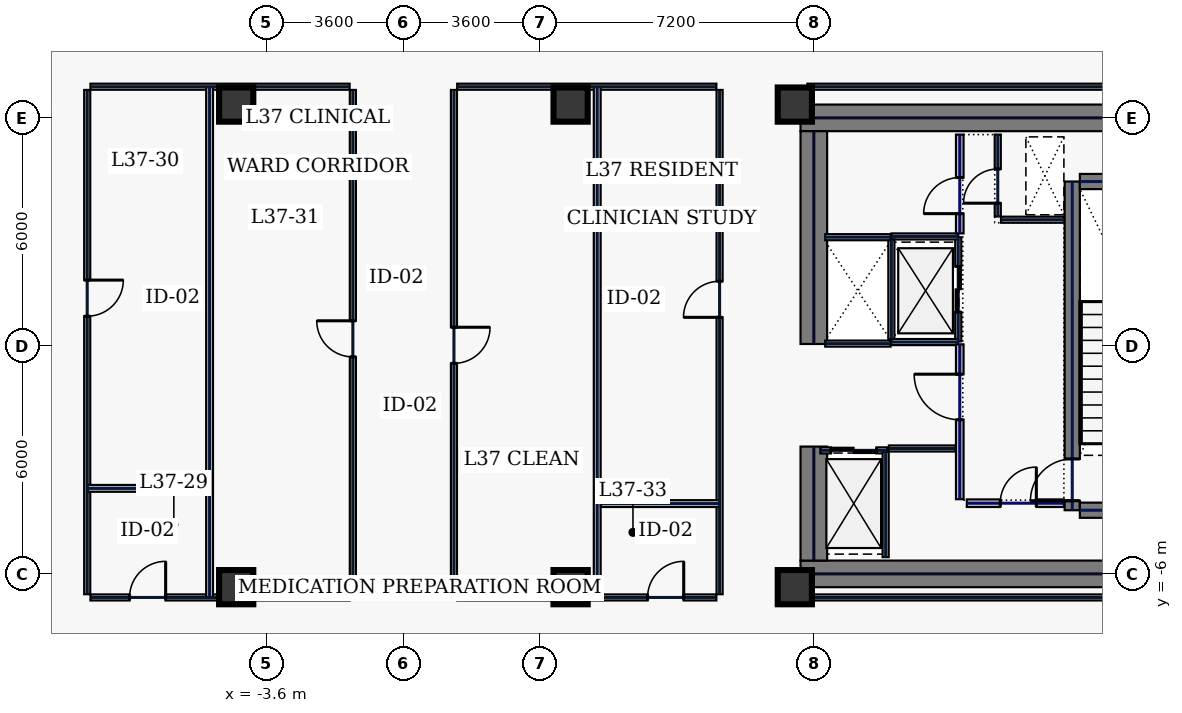
"""IFC4 building model, lengths in metres.
Left out: names, types, materials, properties, quantities, classifications, styles, units other than length and angle.
Written with IfcOpenShell. Run it as: python <this file> out.ifc"""

import sys

from ifc_helpers import new_model, si_unit, direction, frame, frame_2d, origin, origin_2d, place, context, subcontext, project, spatial, rectangle, hollow_rectangle, extrude, element, fill, save


model = new_model("IFC4")
c1 = context("Model", 3, precision=1e-05, world=origin(), true_north=direction((0.0, 1.0)))
c2 = subcontext(c1, "Body", "Model", "MODEL_VIEW")
j1 = project(units=[si_unit("LENGTHUNIT", "METRE"), si_unit("PLANEANGLEUNIT", "RADIAN")], contexts=[c1])
p1 = place(None, origin())
s1 = spatial("IfcSite", under=j1, at=p1, CompositionType="ELEMENT")
p2 = place(p1, origin())
s2 = spatial("IfcBuilding", under=s1, at=p2, CompositionType="ELEMENT")
p3 = place(p2, frame((0.0, 0.0, 164.2)))
s3 = spatial("IfcBuildingStorey", under=s2, at=p3, CompositionType="ELEMENT", Elevation=164.2)
for number, where, z_axis, x_axis in (
    (1, (10.45, 6.0, 0.0), (0.0, 0.0, 1.0), (1.0, 0.0, 0.0)),
    (2, (10.45, -6.0, 0.0), (0.0, 0.0, 1.0), (1.0, 0.0, 0.0)),
):
    element("IfcWall", number, at=place(p3, frame(where, z_axis=z_axis, x_axis=x_axis)), inside=s3, PredefinedType="SHEAR", context=c2, shape_type="SweptSolid", body=[
        extrude(rectangle(XDim=11.55, YDim=0.7, at=frame_2d((5.775, 0.0))), origin(), (0.0, 0.0, 1.0), 3.74),
    ])
p4 = place(p3, frame((10.8, -5.65, 0.0), z_axis=(0.0, 0.0, 1.0), x_axis=(0.0, 1.0, 0.0)))
e3 = element("IfcWall", 3, at=p4, inside=s3, PredefinedType="SHEAR", context=c2, shape_type="SweptSolid", body=[
    extrude(rectangle(XDim=3.0, YDim=0.7, at=frame_2d((1.5, 0.0))), origin(), (0.0, 0.0, 1.0), 3.74),
])
p5 = place(p3, frame((10.8, 0.05, 0.0), z_axis=(0.0, 0.0, 1.0), x_axis=(0.0, 1.0, 0.0)))
e4 = element("IfcWall", 4, at=p5, inside=s3, PredefinedType="SHEAR", context=c2, shape_type="SweptSolid", body=[
    extrude(rectangle(XDim=5.6, YDim=0.7, at=frame_2d((2.8, 0.0))), origin(), (0.0, 0.0, 1.0), 3.74),
])
p6 = place(p3, frame((17.6, -4.325, 0.0), z_axis=(0.0, 0.0, 1.0), x_axis=(0.0, 1.0, 0.0)))
e5 = element("IfcWall", 5, at=p6, inside=s3, PredefinedType="SHEAR", context=c2, shape_type="SweptSolid", body=[
    extrude(rectangle(XDim=8.65, YDim=0.4, at=frame_2d((4.325, 0.0))), origin(), (0.0, 0.0, 1.0), 3.74),
])
p7 = place(p6, frame((0.25, 0.0, 0.0)))
e6 = element("IfcOpeningElement", 6, at=p7, cuts=e5, PredefinedType="OPENING", context=c2, shape_type="SweptSolid", body=[
    extrude(rectangle(XDim=1.1, YDim=2.2, at=frame_2d((0.55, 1.1))), frame((0.0, 0.21, 0.0), z_axis=(0.0, -1.0, 0.0), x_axis=(1.0, 0.0, 0.0)), (0.0, 0.0, 1.0), 0.42),
])
for number, where, z_axis, x_axis in (
    (7, (17.8, -4.325, 0.0), (0.0, 0.0, 1.0), (1.0, 0.0, 0.0)),
    (8, (17.8, 4.325, 0.0), (0.0, 0.0, 1.0), (1.0, 0.0, 0.0)),
):
    element("IfcWall", number, at=place(p3, frame(where, z_axis=z_axis, x_axis=x_axis)), inside=s3, PredefinedType="SHEAR", context=c2, shape_type="SweptSolid", body=[
        extrude(rectangle(XDim=3.4, YDim=0.4, at=frame_2d((1.7, 0.0))), origin(), (0.0, 0.0, 1.0), 3.74),
    ])
for number, where, z_axis, x_axis in (
    (9, (10.3, -6.35, 0.0), (0.0, 0.0, 1.0), (1.0, 0.0, 0.0)),
    (10, (10.3, 6.35, 0.0), (0.0, 0.0, 1.0), (1.0, 0.0, 0.0)),
    (11, (-4.4, -6.35, 0.0), (0.0, 0.0, 1.0), (1.0, 0.0, 0.0)),
    (12, (4.4, -6.35, 0.0), (0.0, 0.0, 1.0), (1.0, 0.0, 0.0)),
    (13, (-4.4, 6.35, 0.0), (0.0, 0.0, 1.0), (1.0, 0.0, 0.0)),
    (14, (4.4, 6.35, 0.0), (0.0, 0.0, 1.0), (1.0, 0.0, 0.0)),
):
    element("IfcColumn", number, at=place(p3, frame(where, z_axis=z_axis, x_axis=x_axis)), inside=s3, PredefinedType="COLUMN", context=c2, shape_type="SweptSolid", body=[
        extrude(hollow_rectangle(XDim=0.9, YDim=0.9, WallThickness=0.04, at=origin_2d()), origin(), (0.0, 0.0, 1.0), 3.74),
    ])
p8 = place(p3, frame((14.6, 0.12, 0.0), z_axis=(0.0, 0.0, 1.0), x_axis=(0.0, 1.0, 0.0)))
e15 = element("IfcWall", 15, at=p8, inside=s3, PredefinedType="PARTITIONING", context=c2, shape_type="SweptSolid", body=[
    extrude(rectangle(XDim=2.74, YDim=0.16, at=frame_2d((1.37, 0.0))), origin(), (0.0, 0.0, 1.0), 3.74),
])
p9 = place(p8, frame((0.77, 0.0, 0.0)))
e16 = element("IfcOpeningElement", 16, at=p9, cuts=e15, PredefinedType="OPENING", context=c2, shape_type="SweptSolid", body=[
    extrude(rectangle(XDim=1.2, YDim=2.2, at=frame_2d((0.6, 1.1))), frame((0.0, 0.09, 0.0), z_axis=(0.0, -1.0, 0.0), x_axis=(1.0, 0.0, 0.0)), (0.0, 0.0, 1.0), 0.18),
])
for number, where, z_axis, x_axis in (
    (17, (12.84, 0.1, 0.0), (0.0, 0.0, 1.0), (1.0, 0.0, 0.0)),
    (18, (12.84, 2.88, 0.0), (0.0, 0.0, 1.0), (1.0, 0.0, 0.0)),
):
    element("IfcWall", number, at=place(p3, frame(where, z_axis=z_axis, x_axis=x_axis)), inside=s3, PredefinedType="PARTITIONING", context=c2, shape_type="SweptSolid", body=[
        extrude(rectangle(XDim=1.76, YDim=0.16, at=frame_2d((0.88, 0.0))), origin(), (0.0, 0.0, 1.0), 3.74),
    ])
p10 = place(p3, frame((12.84, 0.18, 0.0), z_axis=(0.0, 0.0, 1.0), x_axis=(0.0, 1.0, 0.0)))
e19 = element("IfcWall", 19, at=p10, inside=s3, PredefinedType="PARTITIONING", context=c2, shape_type="SweptSolid", body=[
    extrude(rectangle(XDim=2.62, YDim=0.16, at=frame_2d((1.31, 0.0))), origin(), (0.0, 0.0, 1.0), 3.74),
])
p11 = place(p3, frame((10.97, -2.75, 0.0), z_axis=(0.0, 0.0, 1.0), x_axis=(1.0, 0.0, 0.0)))
e20 = element("IfcWall", 20, at=p11, inside=s3, PredefinedType="PARTITIONING", context=c2, shape_type="SweptSolid", body=[
    extrude(rectangle(XDim=1.76, YDim=0.16, at=frame_2d((0.88, 0.0))), origin(), (0.0, 0.0, 1.0), 3.74),
])
p12 = place(p11, frame((0.28, 0.0, 0.0)))
e21 = element("IfcOpeningElement", 21, at=p12, cuts=e20, PredefinedType="OPENING", context=c2, shape_type="SweptSolid", body=[
    extrude(rectangle(XDim=1.2, YDim=2.2, at=frame_2d((0.6, 1.1))), frame((0.0, 0.09, 0.0), z_axis=(0.0, -1.0, 0.0), x_axis=(1.0, 0.0, 0.0)), (0.0, 0.0, 1.0), 0.18),
])
for number, where, z_axis, x_axis in (
    (22, (11.1, 0.06, 0.0), (0.0, 0.0, 1.0), (1.0, 0.0, 0.0)),
    (23, (11.1, 2.86, 0.0), (0.0, 0.0, 1.0), (1.0, 0.0, 0.0)),
):
    element("IfcWall", number, at=place(p3, frame(where, z_axis=z_axis, x_axis=x_axis)), inside=s3, PredefinedType="PARTITIONING", context=c2, shape_type="SweptSolid", body=[
        extrude(rectangle(XDim=1.72, YDim=0.16, at=frame_2d((0.86, 0.0))), origin(), (0.0, 0.0, 1.0), 3.74),
    ])
p13 = place(p3, frame((15.64, 3.405, 0.0), z_axis=(0.0, 0.0, 1.0), x_axis=(0.0, 1.0, 0.0)))
e24 = element("IfcWall", 24, at=p13, inside=s3, PredefinedType="PARTITIONING", context=c2, shape_type="SweptSolid", body=[
    extrude(rectangle(XDim=2.155, YDim=0.16, at=frame_2d((1.078, 0.0))), origin(), (0.0, 0.0, 1.0), 3.74),
])
p14 = place(p13, frame((0.35, 0.0, 0.0)))
e25 = element("IfcOpeningElement", 25, at=p14, cuts=e24, PredefinedType="OPENING", context=c2, shape_type="SweptSolid", body=[
    extrude(rectangle(XDim=0.9, YDim=2.2, at=frame_2d((0.45, 1.1))), frame((0.0, 0.09, 0.0), z_axis=(0.0, -1.0, 0.0), x_axis=(1.0, 0.0, 0.0)), (0.0, 0.0, 1.0), 0.18),
])
p15 = place(p3, frame((15.725, 3.32, 0.0), z_axis=(0.0, 0.0, 1.0), x_axis=(1.0, 0.0, 0.0)))
e26 = element("IfcWall", 26, at=p15, inside=s3, PredefinedType="PARTITIONING", context=c2, shape_type="SweptSolid", body=[
    extrude(rectangle(XDim=1.655, YDim=0.16, at=frame_2d((0.827, 0.0))), origin(), (0.0, 0.0, 1.0), 3.74),
])
p16 = place(p3, frame((14.825, -4.14, 0.0), z_axis=(0.0, 0.0, 1.0), x_axis=(1.0, 0.0, 0.0)))
e27 = element("IfcWall", 27, at=p16, inside=s3, PredefinedType="SOLIDWALL", context=c2, shape_type="SweptSolid", body=[
    extrude(rectangle(XDim=2.555, YDim=0.2, at=frame_2d((1.277, 0.0))), origin(), (0.0, 0.0, 1.0), 3.74),
])
p17 = place(p16, frame((0.88, 0.0, 0.0)))
e28 = element("IfcOpeningElement", 28, at=p17, cuts=e27, PredefinedType="OPENING", context=c2, shape_type="SweptSolid", body=[
    extrude(rectangle(XDim=0.95, YDim=2.2, at=frame_2d((0.475, 1.1))), frame((0.0, 0.11, 0.0), z_axis=(0.0, -1.0, 0.0), x_axis=(1.0, 0.0, 0.0)), (0.0, 0.0, 1.0), 0.22),
])
p18 = place(p3, frame((12.775, -2.7, 0.0), z_axis=(0.0, 0.0, 1.0), x_axis=(1.0, 0.0, 0.0)))
e29 = element("IfcWall", 29, at=p18, inside=s3, PredefinedType="PARTITIONING", context=c2, shape_type="SweptSolid", body=[
    extrude(rectangle(XDim=1.76, YDim=0.16, at=frame_2d((0.88, 0.0))), origin(), (0.0, 0.0, 1.0), 3.74),
])
p19 = place(p3, frame((12.69, -5.56, 0.0), z_axis=(0.0, 0.0, 1.0), x_axis=(0.0, 1.0, 0.0)))
e30 = element("IfcWall", 30, at=p19, inside=s3, PredefinedType="PARTITIONING", context=c2, shape_type="SweptSolid", body=[
    extrude(rectangle(XDim=2.775, YDim=0.16, at=frame_2d((1.388, 0.0))), origin(), (0.0, 0.0, 1.0), 3.74),
])
p20 = place(p3, frame((14.64, 2.96, 0.0), z_axis=(0.0, 0.0, 1.0), x_axis=(0.0, 1.0, 0.0)))
e31 = element("IfcWall", 31, at=p20, inside=s3, PredefinedType="SOLIDWALL", context=c2, shape_type="SweptSolid", body=[
    extrude(rectangle(XDim=2.6, YDim=0.2, at=frame_2d((1.3, 0.0))), origin(), (0.0, 0.0, 1.0), 3.74),
])
p21 = place(p20, frame((0.52, 0.0, 0.0)))
e32 = element("IfcOpeningElement", 32, at=p21, cuts=e31, PredefinedType="OPENING", context=c2, shape_type="SweptSolid", body=[
    extrude(rectangle(XDim=0.95, YDim=2.2, at=frame_2d((0.475, 1.1))), frame((0.0, 0.11, 0.0), z_axis=(0.0, -1.0, 0.0), x_axis=(1.0, 0.0, 0.0)), (0.0, 0.0, 1.0), 0.22),
])
p22 = place(p3, frame((14.64, -4.035, 0.0), z_axis=(0.0, 0.0, 1.0), x_axis=(0.0, 1.0, 0.0)))
e33 = element("IfcWall", 33, at=p22, inside=s3, PredefinedType="SOLIDWALL", context=c2, shape_type="SweptSolid", body=[
    extrude(rectangle(XDim=4.075, YDim=0.2, at=frame_2d((2.038, 0.0))), origin(), (0.0, 0.0, 1.0), 3.74),
])
p23 = place(p22, frame((2.09, 0.0, 0.0)))
e34 = element("IfcOpeningElement", 34, at=p23, cuts=e33, PredefinedType="OPENING", context=c2, shape_type="SweptSolid", body=[
    extrude(rectangle(XDim=1.2, YDim=2.2, at=frame_2d((0.6, 1.1))), frame((0.0, 0.11, 0.0), z_axis=(0.0, -1.0, 0.0), x_axis=(1.0, 0.0, 0.0)), (0.0, 0.0, 1.0), 0.22),
])
for number, where, z_axis, x_axis in (
    (35, (24.965, 6.82, 0.0), (0.0, 0.0, 1.0), (-1.0, 0.0, 0.0)),
    (36, (10.63, -6.62, 0.0), (0.0, 0.0, 1.0), (1.0, 0.0, 0.0)),
):
    element("IfcWall", number, at=place(p3, frame(where, z_axis=z_axis, x_axis=x_axis)), inside=s3, PredefinedType="PARTITIONING", context=c2, shape_type="SweptSolid", body=[
        extrude(rectangle(XDim=14.335, YDim=0.16, at=frame_2d((7.167, 0.0))), origin(), (0.0, 0.0, 1.0), 3.74),
    ])
p24 = place(p3, frame((8.235, 6.82, 0.0), z_axis=(0.0, 0.0, 1.0), x_axis=(-1.0, 0.0, 0.0)))
e37 = element("IfcWall", 37, at=p24, inside=s3, PredefinedType="PARTITIONING", context=c2, shape_type="SweptSolid", body=[
    extrude(rectangle(XDim=6.82, YDim=0.16, at=frame_2d((3.41, 0.0))), origin(), (0.0, 0.0, 1.0), 3.74),
])
p25 = place(p3, frame((1.33, 6.735, 0.0), z_axis=(0.0, 0.0, 1.0), x_axis=(0.0, -1.0, 0.0)))
e38 = element("IfcWall", 38, at=p25, inside=s3, PredefinedType="PARTITIONING", context=c2, shape_type="SweptSolid", body=[
    extrude(rectangle(XDim=13.27, YDim=0.16, at=frame_2d((6.635, 0.0))), origin(), (0.0, 0.0, 1.0), 3.74),
])
p26 = place(p25, frame((6.245, 0.0, 0.0)))
e39 = element("IfcOpeningElement", 39, at=p26, cuts=e38, PredefinedType="OPENING", context=c2, shape_type="SweptSolid", body=[
    extrude(rectangle(XDim=0.95, YDim=2.2, at=frame_2d((0.475, 1.1))), frame((0.0, 0.09, 0.0), z_axis=(0.0, -1.0, 0.0), x_axis=(1.0, 0.0, 0.0)), (0.0, 0.0, 1.0), 0.18),
])
p27 = place(p3, frame((1.415, -6.62, 0.0), z_axis=(0.0, 0.0, 1.0), x_axis=(1.0, 0.0, 0.0)))
e40 = element("IfcWall", 40, at=p27, inside=s3, PredefinedType="PARTITIONING", context=c2, shape_type="SweptSolid", body=[
    extrude(rectangle(XDim=6.82, YDim=0.16, at=frame_2d((3.41, 0.0))), origin(), (0.0, 0.0, 1.0), 3.74),
])
p28 = place(p27, frame((5.011, 0.0, 0.0)))
e41 = element("IfcOpeningElement", 41, at=p28, cuts=e40, PredefinedType="OPENING", context=c2, shape_type="SweptSolid", body=[
    extrude(rectangle(XDim=0.95, YDim=2.2, at=frame_2d((0.475, 1.1))), frame((0.0, 0.09, 0.0), z_axis=(0.0, -1.0, 0.0), x_axis=(1.0, 0.0, 0.0)), (0.0, 0.0, 1.0), 0.18),
])
p29 = place(p3, frame((8.32, -6.535, 0.0), z_axis=(0.0, 0.0, 1.0), x_axis=(0.0, 1.0, 0.0)))
e42 = element("IfcWall", 42, at=p29, inside=s3, PredefinedType="PARTITIONING", context=c2, shape_type="SweptSolid", body=[
    extrude(rectangle(XDim=13.27, YDim=0.16, at=frame_2d((6.635, 0.0))), origin(), (0.0, 0.0, 1.0), 3.74),
])
p30 = place(p29, frame((7.286, 0.0, 0.0)))
e43 = element("IfcOpeningElement", 43, at=p30, cuts=e42, PredefinedType="OPENING", context=c2, shape_type="SweptSolid", body=[
    extrude(rectangle(XDim=0.95, YDim=2.2, at=frame_2d((0.475, 1.1))), frame((0.0, 0.09, 0.0), z_axis=(0.0, -1.0, 0.0), x_axis=(1.0, 0.0, 0.0)), (0.0, 0.0, 1.0), 0.18),
])
p31 = place(p3, frame((-1.33, -6.535, 0.0), z_axis=(0.0, 0.0, 1.0), x_axis=(0.0, 1.0, 0.0)))
e44 = element("IfcWall", 44, at=p31, inside=s3, PredefinedType="PARTITIONING", context=c2, shape_type="SweptSolid", body=[
    extrude(rectangle(XDim=13.27, YDim=0.16, at=frame_2d((6.635, 0.0))), origin(), (0.0, 0.0, 1.0), 3.74),
])
p32 = place(p31, frame((6.245, 0.0, 0.0)))
e45 = element("IfcOpeningElement", 45, at=p32, cuts=e44, PredefinedType="OPENING", context=c2, shape_type="SweptSolid", body=[
    extrude(rectangle(XDim=0.95, YDim=2.2, at=frame_2d((0.475, 1.1))), frame((0.0, 0.09, 0.0), z_axis=(0.0, -1.0, 0.0), x_axis=(1.0, 0.0, 0.0)), (0.0, 0.0, 1.0), 0.18),
])
p33 = place(p3, frame((-1.415, 6.82, 0.0), z_axis=(0.0, 0.0, 1.0), x_axis=(-1.0, 0.0, 0.0)))
e46 = element("IfcWall", 46, at=p33, inside=s3, PredefinedType="PARTITIONING", context=c2, shape_type="SweptSolid", body=[
    extrude(rectangle(XDim=6.82, YDim=0.16, at=frame_2d((3.41, 0.0))), origin(), (0.0, 0.0, 1.0), 3.74),
])
p34 = place(p3, frame((-8.32, 6.735, 0.0), z_axis=(0.0, 0.0, 1.0), x_axis=(0.0, -1.0, 0.0)))
e47 = element("IfcWall", 47, at=p34, inside=s3, PredefinedType="PARTITIONING", context=c2, shape_type="SweptSolid", body=[
    extrude(rectangle(XDim=13.27, YDim=0.16, at=frame_2d((6.635, 0.0))), origin(), (0.0, 0.0, 1.0), 3.74),
])
p35 = place(p34, frame((5.004, 0.0, 0.0)))
e48 = element("IfcOpeningElement", 48, at=p35, cuts=e47, PredefinedType="OPENING", context=c2, shape_type="SweptSolid", body=[
    extrude(rectangle(XDim=0.95, YDim=2.2, at=frame_2d((0.475, 1.1))), frame((0.0, 0.09, 0.0), z_axis=(0.0, -1.0, 0.0), x_axis=(1.0, 0.0, 0.0)), (0.0, 0.0, 1.0), 0.18),
])
p36 = place(p3, frame((-8.235, -6.62, 0.0), z_axis=(0.0, 0.0, 1.0), x_axis=(1.0, 0.0, 0.0)))
e49 = element("IfcWall", 49, at=p36, inside=s3, PredefinedType="PARTITIONING", context=c2, shape_type="SweptSolid", body=[
    extrude(rectangle(XDim=6.82, YDim=0.16, at=frame_2d((3.41, 0.0))), origin(), (0.0, 0.0, 1.0), 3.74),
])
p37 = place(p36, frame((1.029, 0.0, 0.0)))
e50 = element("IfcOpeningElement", 50, at=p37, cuts=e49, PredefinedType="OPENING", context=c2, shape_type="SweptSolid", body=[
    extrude(rectangle(XDim=0.95, YDim=2.2, at=frame_2d((0.475, 1.1))), frame((0.0, 0.09, 0.0), z_axis=(0.0, -1.0, 0.0), x_axis=(1.0, 0.0, 0.0)), (0.0, 0.0, 1.0), 0.18),
])
for number, where, z_axis, x_axis in (
    (51, (-5.1, -6.615, 0.0), (0.0, 0.0, 1.0), (0.0, 1.0, 0.0)),
    (52, (5.1, -6.615, 0.0), (0.0, 0.0, 1.0), (0.0, 1.0, 0.0)),
):
    element("IfcWall", number, at=place(p3, frame(where, z_axis=z_axis, x_axis=x_axis)), inside=s3, PredefinedType="PARTITIONING", context=c2, shape_type="SweptSolid", body=[
        extrude(rectangle(XDim=13.43, YDim=0.18, at=frame_2d((6.715, 0.0))), origin(), (0.0, 0.0, 1.0), 3.74),
    ])
for number, where, z_axis, x_axis in (
    (53, (-8.315, -3.75, 0.0), (0.0, 0.0, 1.0), (1.0, 0.0, 0.0)),
    (54, (5.195, -4.15, 0.0), (0.0, 0.0, 1.0), (1.0, 0.0, 0.0)),
):
    element("IfcWall", number, at=place(p3, frame(where, z_axis=z_axis, x_axis=x_axis)), inside=s3, PredefinedType="PARTITIONING", context=c2, shape_type="SweptSolid", body=[
        extrude(rectangle(XDim=3.12, YDim=0.18, at=frame_2d((1.56, 0.0))), origin(), (0.0, 0.0, 1.0), 3.74),
    ])
p38 = place(p7, origin())
e55 = element("IfcDoor", 55, at=p38, inside=s3, OperationType="SINGLE_SWING_LEFT", PredefinedType="DOOR", context=c2, shape_type="SweptSolid", body=[
    extrude(rectangle(XDim=1.1, YDim=2.2, at=frame_2d((0.55, 1.1))), frame((0.0, 0.025, 0.0), z_axis=(0.0, -1.0, 0.0), x_axis=(1.0, 0.0, 0.0)), (0.0, 0.0, 1.0), 0.05),
])
fill(e6, e55)
p39 = place(p9, origin())
e56 = element("IfcDoor", 56, at=p39, inside=s3, OperationType="SLIDING_TO_LEFT", PredefinedType="DOOR", context=c2, shape_type="SweptSolid", body=[
    extrude(rectangle(XDim=1.2, YDim=2.2, at=frame_2d((0.6, 1.1))), frame((0.0, 0.025, 0.0), z_axis=(0.0, -1.0, 0.0), x_axis=(1.0, 0.0, 0.0)), (0.0, 0.0, 1.0), 0.05),
])
fill(e16, e56)
p40 = place(p12, origin())
e57 = element("IfcDoor", 57, at=p40, inside=s3, OperationType="SLIDING_TO_LEFT", PredefinedType="DOOR", context=c2, shape_type="SweptSolid", body=[
    extrude(rectangle(XDim=1.2, YDim=2.2, at=frame_2d((0.6, 1.1))), frame((0.0, 0.025, 0.0), z_axis=(0.0, -1.0, 0.0), x_axis=(1.0, 0.0, 0.0)), (0.0, 0.0, 1.0), 0.05),
])
fill(e21, e57)
p41 = place(p14, origin())
e58 = element("IfcDoor", 58, at=p41, inside=s3, OperationType="SINGLE_SWING_LEFT", PredefinedType="DOOR", context=c2, shape_type="SweptSolid", body=[
    extrude(rectangle(XDim=0.9, YDim=2.2, at=frame_2d((0.45, 1.1))), frame((0.0, 0.025, 0.0), z_axis=(0.0, -1.0, 0.0), x_axis=(1.0, 0.0, 0.0)), (0.0, 0.0, 1.0), 0.05),
])
fill(e25, e58)
p42 = place(p17, origin())
e59 = element("IfcDoor", 59, at=p42, inside=s3, OperationType="SINGLE_SWING_RIGHT", PredefinedType="DOOR", context=c2, shape_type="SweptSolid", body=[
    extrude(rectangle(XDim=0.95, YDim=2.2, at=frame_2d((0.475, 1.1))), frame((0.0, 0.025, 0.0), z_axis=(0.0, -1.0, 0.0), x_axis=(1.0, 0.0, 0.0)), (0.0, 0.0, 1.0), 0.05),
])
fill(e28, e59)
p43 = place(p21, origin())
e60 = element("IfcDoor", 60, at=p43, inside=s3, OperationType="SINGLE_SWING_LEFT", PredefinedType="DOOR", context=c2, shape_type="SweptSolid", body=[
    extrude(rectangle(XDim=0.95, YDim=2.2, at=frame_2d((0.475, 1.1))), frame((0.0, 0.025, 0.0), z_axis=(0.0, -1.0, 0.0), x_axis=(1.0, 0.0, 0.0)), (0.0, 0.0, 1.0), 0.05),
])
fill(e32, e60)
p44 = place(p23, origin())
e61 = element("IfcDoor", 61, at=p44, inside=s3, OperationType="SINGLE_SWING_RIGHT", PredefinedType="DOOR", context=c2, shape_type="SweptSolid", body=[
    extrude(rectangle(XDim=1.2, YDim=2.2, at=frame_2d((0.6, 1.1))), frame((0.0, 0.025, 0.0), z_axis=(0.0, -1.0, 0.0), x_axis=(1.0, 0.0, 0.0)), (0.0, 0.0, 1.0), 0.05),
])
fill(e34, e61)
p45 = place(p37, origin())
e62 = element("IfcDoor", 62, at=p45, inside=s3, OperationType="SINGLE_SWING_RIGHT", PredefinedType="DOOR", context=c2, shape_type="SweptSolid", body=[
    extrude(rectangle(XDim=0.95, YDim=2.2, at=frame_2d((0.475, 1.1))), frame((0.0, 0.025, 0.0), z_axis=(0.0, -1.0, 0.0), x_axis=(1.0, 0.0, 0.0)), (0.0, 0.0, 1.0), 0.05),
])
fill(e50, e62)
p46 = place(p35, origin())
e63 = element("IfcDoor", 63, at=p46, inside=s3, OperationType="SINGLE_SWING_LEFT", PredefinedType="DOOR", context=c2, shape_type="SweptSolid", body=[
    extrude(rectangle(XDim=0.95, YDim=2.2, at=frame_2d((0.475, 1.1))), frame((0.0, 0.025, 0.0), z_axis=(0.0, -1.0, 0.0), x_axis=(1.0, 0.0, 0.0)), (0.0, 0.0, 1.0), 0.05),
])
fill(e48, e63)
p47 = place(p32, origin())
e64 = element("IfcDoor", 64, at=p47, inside=s3, OperationType="SINGLE_SWING_RIGHT", PredefinedType="DOOR", context=c2, shape_type="SweptSolid", body=[
    extrude(rectangle(XDim=0.95, YDim=2.2, at=frame_2d((0.475, 1.1))), frame((0.0, 0.025, 0.0), z_axis=(0.0, -1.0, 0.0), x_axis=(1.0, 0.0, 0.0)), (0.0, 0.0, 1.0), 0.05),
])
fill(e45, e64)
p48 = place(p26, origin())
e65 = element("IfcDoor", 65, at=p48, inside=s3, OperationType="SINGLE_SWING_LEFT", PredefinedType="DOOR", context=c2, shape_type="SweptSolid", body=[
    extrude(rectangle(XDim=0.95, YDim=2.2, at=frame_2d((0.475, 1.1))), frame((0.0, 0.025, 0.0), z_axis=(0.0, -1.0, 0.0), x_axis=(1.0, 0.0, 0.0)), (0.0, 0.0, 1.0), 0.05),
])
fill(e39, e65)
p49 = place(p28, origin())
e66 = element("IfcDoor", 66, at=p49, inside=s3, OperationType="SINGLE_SWING_RIGHT", PredefinedType="DOOR", context=c2, shape_type="SweptSolid", body=[
    extrude(rectangle(XDim=0.95, YDim=2.2, at=frame_2d((0.475, 1.1))), frame((0.0, 0.025, 0.0), z_axis=(0.0, -1.0, 0.0), x_axis=(1.0, 0.0, 0.0)), (0.0, 0.0, 1.0), 0.05),
])
fill(e41, e66)
p50 = place(p30, origin())
e67 = element("IfcDoor", 67, at=p50, inside=s3, OperationType="SINGLE_SWING_LEFT", PredefinedType="DOOR", context=c2, shape_type="SweptSolid", body=[
    extrude(rectangle(XDim=0.95, YDim=2.2, at=frame_2d((0.475, 1.1))), frame((0.0, 0.025, 0.0), z_axis=(0.0, -1.0, 0.0), x_axis=(1.0, 0.0, 0.0)), (0.0, 0.0, 1.0), 0.05),
])
fill(e43, e67)
save(model, sys.argv[1])
